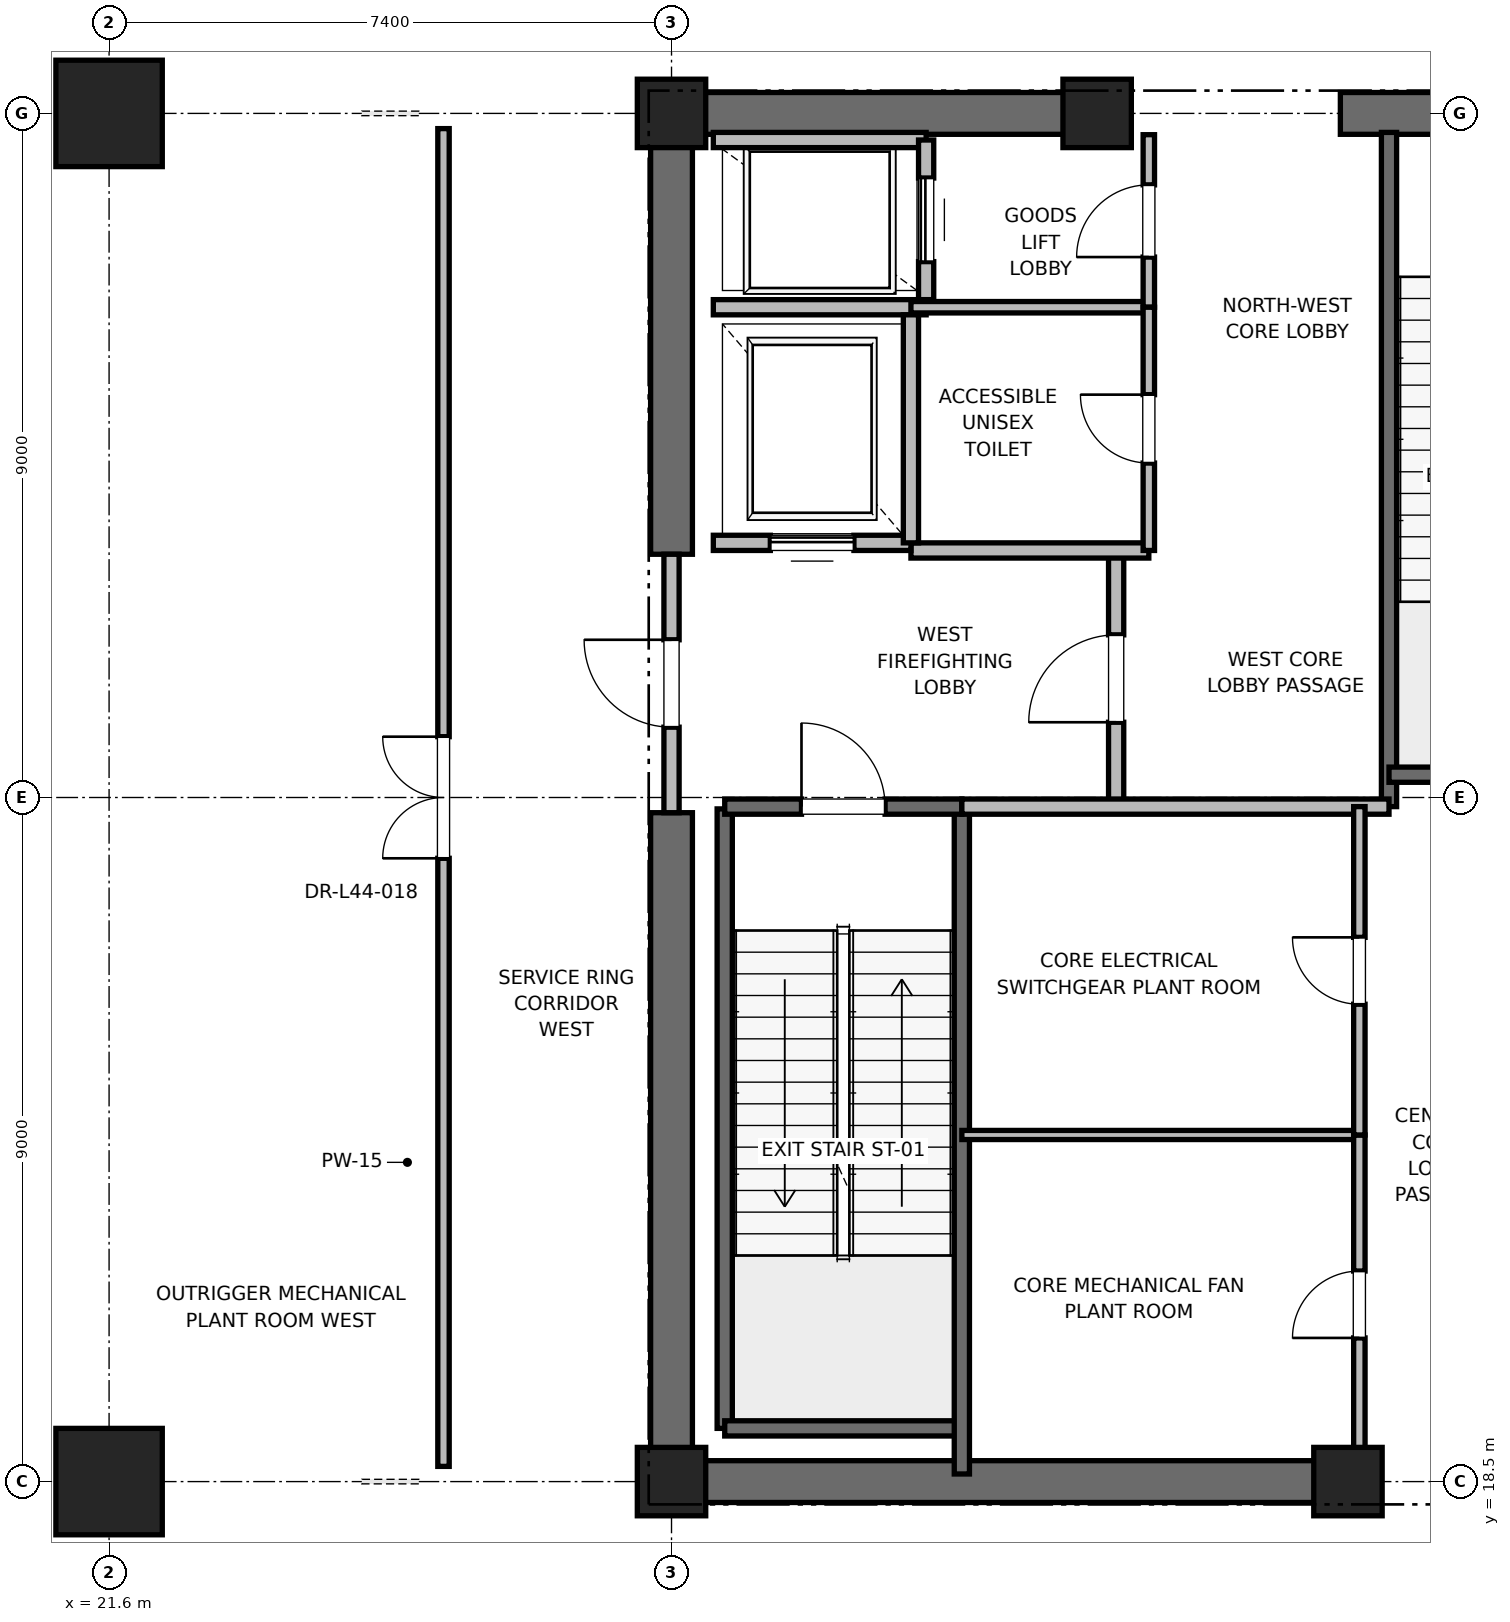
"""IFC4 building model, lengths in metres.
Left out: names, types, materials, properties, quantities, classifications, styles, units other than length and angle.
Written with IfcOpenShell. Run it as: python <this file> out.ifc"""

import sys

from ifc_helpers import new_model, si_unit, direction, frame, frame_2d, origin, origin_2d, place, context, subcontext, project, spatial, rectangle, extrude, element, fill, save


model = new_model("IFC4")
c1 = context("Model", 3, precision=1e-05, world=origin(), true_north=direction((0.0, 1.0)))
c2 = subcontext(c1, "Body", "Model", "MODEL_VIEW")
j1 = project(units=[si_unit("LENGTHUNIT", "METRE"), si_unit("PLANEANGLEUNIT", "RADIAN")], contexts=[c1])
p1 = place(None, origin())
s1 = spatial("IfcSite", under=j1, at=p1, CompositionType="ELEMENT")
p2 = place(p1, origin())
s2 = spatial("IfcBuilding", under=s1, at=p2, CompositionType="ELEMENT")
p3 = place(p2, frame((0.0, 0.0, 189.4)))
s3 = spatial("IfcBuildingStorey", under=s2, at=p3, CompositionType="ELEMENT", Elevation=189.4)
for number, where, z_axis, x_axis in (
    (1, (21.6, 18.5, 0.0), (0.0, 0.0, 1.0), (1.0, 0.0, 0.0)),
    (2, (21.6, 36.5, 0.0), (0.0, 0.0, 1.0), (1.0, 0.0, 0.0)),
):
    element("IfcColumn", number, at=place(p3, frame(where, z_axis=z_axis, x_axis=x_axis)), inside=s3, PredefinedType="COLUMN", context=c2, shape_type="SweptSolid", body=[
        extrude(rectangle(XDim=1.4, YDim=1.4, at=origin_2d()), origin(), (0.0, 0.0, 1.0), 5.4),
    ])
for number, where, z_axis, x_axis in (
    (3, (29.0, 18.5, 0.0), (0.0, 0.0, 1.0), (1.0, 0.0, 0.0)),
    (4, (29.0, 36.5, 0.0), (0.0, 0.0, 1.0), (1.0, 0.0, 0.0)),
    (5, (37.9, 18.5, 0.0), (0.0, 0.0, 1.0), (1.0, 0.0, 0.0)),
    (6, (34.6, 36.5, 0.0), (0.0, 0.0, 1.0), (1.0, 0.0, 0.0)),
):
    element("IfcColumn", number, at=place(p3, frame(where, z_axis=z_axis, x_axis=x_axis)), inside=s3, PredefinedType="PILASTER", context=c2, shape_type="SweptSolid", body=[
        extrude(rectangle(XDim=0.9, YDim=0.9, at=origin_2d()), origin(), (0.0, 0.0, 1.0), 5.4),
    ])
p4 = place(p3, frame((29.0, 18.5, 0.0), z_axis=(0.0, 0.0, 1.0), x_axis=(1.0, 0.0, 0.0)))
e7 = element("IfcWall", 7, at=p4, inside=s3, PredefinedType="SHEAR", context=c2, shape_type="SweptSolid", body=[
    extrude(rectangle(XDim=9.2, YDim=0.55, at=frame_2d((4.6, 0.0))), origin(), (0.0, 0.0, 1.0), 5.1),
])
p5 = place(p3, frame((29.0, 36.5, 0.0), z_axis=(0.0, 0.0, 1.0), x_axis=(1.0, 0.0, 0.0)))
e8 = element("IfcWall", 8, at=p5, inside=s3, PredefinedType="SHEAR", context=c2, shape_type="SweptSolid", body=[
    extrude(rectangle(XDim=5.8, YDim=0.55, at=frame_2d((2.9, 0.0))), origin(), (0.0, 0.0, 1.0), 5.1),
])
p6 = place(p3, frame((37.8, 36.5, 0.0), z_axis=(0.0, 0.0, 1.0), x_axis=(1.0, 0.0, 0.0)))
e9 = element("IfcWall", 9, at=p6, inside=s3, PredefinedType="SHEAR", context=c2, shape_type="SweptSolid", body=[
    extrude(rectangle(XDim=4.4, YDim=0.55, at=frame_2d((2.2, 0.0))), origin(), (0.0, 0.0, 1.0), 5.1),
])
p7 = place(p6, frame((1.65, 0.0, 0.0)))
e10 = element("IfcOpeningElement", 10, at=p7, cuts=e9, PredefinedType="OPENING", context=c2, shape_type="SweptSolid", body=[
    extrude(rectangle(XDim=1.1, YDim=2.15, at=frame_2d((0.55, 1.075))), frame((0.0, 0.275, 0.0), z_axis=(0.0, -1.0, 0.0), x_axis=(1.0, 0.0, 0.0)), (0.0, 0.0, 1.0), 0.55),
])
p8 = place(p3, frame((29.0, 18.5, 0.0), z_axis=(0.0, 0.0, 1.0), x_axis=(0.0, 1.0, 0.0)))
e11 = element("IfcWall", 11, at=p8, inside=s3, PredefinedType="SHEAR", context=c2, shape_type="SweptSolid", body=[
    extrude(rectangle(XDim=8.8, YDim=0.55, at=frame_2d((4.4, 0.0))), origin(), (0.0, 0.0, 1.0), 5.1),
])
p9 = place(p3, frame((29.0, 30.7, 0.0), z_axis=(0.0, 0.0, 1.0), x_axis=(0.0, 1.0, 0.0)))
e12 = element("IfcWall", 12, at=p9, inside=s3, PredefinedType="SHEAR", context=c2, shape_type="SweptSolid", body=[
    extrude(rectangle(XDim=5.8, YDim=0.55, at=frame_2d((2.9, 0.0))), origin(), (0.0, 0.0, 1.0), 5.1),
])
p10 = place(p3, frame((29.7, 19.2, 0.0), z_axis=(0.0, 0.0, 1.0), x_axis=(0.0, 1.0, 0.0)))
e13 = element("IfcWall", 13, at=p10, inside=s3, PredefinedType="SOLIDWALL", context=c2, shape_type="SweptSolid", body=[
    extrude(rectangle(XDim=8.15, YDim=0.2, at=frame_2d((4.075, 0.0))), origin(), (0.0, 0.0, 1.0), 5.1),
])
p11 = place(p3, frame((29.7, 19.2, 0.0), z_axis=(0.0, 0.0, 1.0), x_axis=(1.0, 0.0, 0.0)))
e14 = element("IfcWall", 14, at=p11, inside=s3, PredefinedType="SOLIDWALL", context=c2, shape_type="SweptSolid", body=[
    extrude(rectangle(XDim=3.12, YDim=0.2, at=frame_2d((1.56, 0.0))), origin(), (0.0, 0.0, 1.0), 5.1),
])
p12 = place(p3, frame((32.82, 18.6, 0.0), z_axis=(0.0, 0.0, 1.0), x_axis=(0.0, 1.0, 0.0)))
e15 = element("IfcWall", 15, at=p12, inside=s3, PredefinedType="SOLIDWALL", context=c2, shape_type="SweptSolid", body=[
    extrude(rectangle(XDim=8.78, YDim=0.2, at=frame_2d((4.39, 0.0))), origin(), (0.0, 0.0, 1.0), 5.1),
])
p13 = place(p3, frame((29.7, 27.38, 0.0), z_axis=(0.0, 0.0, 1.0), x_axis=(1.0, 0.0, 0.0)))
e16 = element("IfcWall", 16, at=p13, inside=s3, PredefinedType="SOLIDWALL", context=c2, shape_type="SweptSolid", body=[
    extrude(rectangle(XDim=3.12, YDim=0.2, at=frame_2d((1.56, 0.0))), origin(), (0.0, 0.0, 1.0), 5.1),
])
p14 = place(p13, frame((1.01, 0.0, 0.0)))
e17 = element("IfcOpeningElement", 17, at=p14, cuts=e16, PredefinedType="OPENING", context=c2, shape_type="SweptSolid", body=[
    extrude(rectangle(XDim=1.1, YDim=2.15, at=frame_2d((0.55, 1.075))), frame((0.0, 0.1, 0.0), z_axis=(0.0, -1.0, 0.0), x_axis=(1.0, 0.0, 0.0)), (0.0, 0.0, 1.0), 0.2),
])
p15 = place(p3, frame((38.44, 27.38, 0.0), z_axis=(0.0, 0.0, 1.0), x_axis=(0.0, 1.0, 0.0)))
e18 = element("IfcWall", 18, at=p15, inside=s3, PredefinedType="SOLIDWALL", context=c2, shape_type="SweptSolid", body=[
    extrude(rectangle(XDim=8.87, YDim=0.2, at=frame_2d((4.435, 0.0))), origin(), (0.0, 0.0, 1.0), 5.1),
])
p16 = place(p3, frame((38.44, 27.8, 0.0), z_axis=(0.0, 0.0, 1.0), x_axis=(1.0, 0.0, 0.0)))
e19 = element("IfcWall", 19, at=p16, inside=s3, PredefinedType="SOLIDWALL", context=c2, shape_type="SweptSolid", body=[
    extrude(rectangle(XDim=3.32, YDim=0.2, at=frame_2d((1.66, 0.0))), origin(), (0.0, 0.0, 1.0), 5.1),
])
p17 = place(p3, frame((34.85, 27.38, 0.0), z_axis=(0.0, 0.0, 1.0), x_axis=(0.0, 1.0, 0.0)))
e20 = element("IfcWall", 20, at=p17, inside=s3, PredefinedType="PARTITIONING", context=c2, shape_type="SweptSolid", body=[
    extrude(rectangle(XDim=3.37, YDim=0.2, at=frame_2d((1.685, 0.0))), origin(), (0.0, 0.0, 1.0), 5.1),
])
p18 = place(p17, frame((1.11, 0.0, 0.0)))
e21 = element("IfcOpeningElement", 21, at=p18, cuts=e20, PredefinedType="OPENING", context=c2, shape_type="SweptSolid", body=[
    extrude(rectangle(XDim=1.15, YDim=2.2, at=frame_2d((0.575, 1.1))), frame((0.0, 0.1, 0.0), z_axis=(0.0, -1.0, 0.0), x_axis=(1.0, 0.0, 0.0)), (0.0, 0.0, 1.0), 0.2),
])
p19 = place(p3, frame((29.0, 27.3, 0.0), z_axis=(0.0, 0.0, 1.0), x_axis=(0.0, 1.0, 0.0)))
e22 = element("IfcWall", 22, at=p19, inside=s3, PredefinedType="PARTITIONING", context=c2, shape_type="SweptSolid", body=[
    extrude(rectangle(XDim=3.4, YDim=0.2, at=frame_2d((1.7, 0.0))), origin(), (0.0, 0.0, 1.0), 4.08),
])
p20 = place(p19, frame((1.125, 0.0, 0.0)))
e23 = element("IfcOpeningElement", 23, at=p20, cuts=e22, PredefinedType="OPENING", context=c2, shape_type="SweptSolid", body=[
    extrude(rectangle(XDim=1.15, YDim=2.2, at=frame_2d((0.575, 1.1))), frame((0.0, 0.1, 0.0), z_axis=(0.0, -1.0, 0.0), x_axis=(1.0, 0.0, 0.0)), (0.0, 0.0, 1.0), 0.2),
])
p21 = place(p3, frame((32.82, 27.38, 0.0), z_axis=(0.0, 0.0, 1.0), x_axis=(1.0, 0.0, 0.0)))
e24 = element("IfcWall", 24, at=p21, inside=s3, PredefinedType="PARTITIONING", context=c2, shape_type="SweptSolid", body=[
    extrude(rectangle(XDim=5.62, YDim=0.2, at=frame_2d((2.81, 0.0))), origin(), (0.0, 0.0, 1.0), 5.1),
])
p22 = place(p3, frame((32.15, 30.75, 0.0), z_axis=(0.0, 0.0, 1.0), x_axis=(1.0, 0.0, 0.0)))
e25 = element("IfcWall", 25, at=p22, inside=s3, PredefinedType="PARTITIONING", context=c2, shape_type="SweptSolid", body=[
    extrude(rectangle(XDim=3.13, YDim=0.2, at=frame_2d((1.565, 0.0))), origin(), (0.0, 0.0, 1.0), 5.1),
])
p23 = place(p3, frame((29.55, 30.85, 0.0), z_axis=(0.0, 0.0, 1.0), x_axis=(1.0, 0.0, 0.0)))
e26 = element("IfcWall", 26, at=p23, inside=s3, PredefinedType="SOLIDWALL", context=c2, shape_type="SweptSolid", body=[
    extrude(rectangle(XDim=2.6, YDim=0.2, at=frame_2d((1.3, 0.0))), origin(), (0.0, 0.0, 1.0), 4.08),
])
p24 = place(p23, frame((0.75, 0.0, 0.0)))
e27 = element("IfcOpeningElement", 27, at=p24, cuts=e26, PredefinedType="OPENING", context=c2, shape_type="SweptSolid", body=[
    extrude(rectangle(XDim=1.1, YDim=2.2, at=frame_2d((0.55, 1.1))), frame((0.0, 0.1, 0.0), z_axis=(0.0, -1.0, 0.0), x_axis=(1.0, 0.0, 0.0)), (0.0, 0.0, 1.0), 0.2),
])
p25 = place(p3, frame((29.55, 33.95, 0.0), z_axis=(0.0, 0.0, 1.0), x_axis=(1.0, 0.0, 0.0)))
e28 = element("IfcWall", 28, at=p25, inside=s3, PredefinedType="SOLIDWALL", context=c2, shape_type="SweptSolid", body=[
    extrude(rectangle(XDim=2.8, YDim=0.2, at=frame_2d((1.4, 0.0))), origin(), (0.0, 0.0, 1.0), 5.1),
])
p26 = place(p3, frame((32.15, 30.85, 0.0), z_axis=(0.0, 0.0, 1.0), x_axis=(0.0, 1.0, 0.0)))
e29 = element("IfcWall", 29, at=p26, inside=s3, PredefinedType="SOLIDWALL", context=c2, shape_type="SweptSolid", body=[
    extrude(rectangle(XDim=3.0, YDim=0.2, at=frame_2d((1.5, 0.0))), origin(), (0.0, 0.0, 1.0), 5.1),
])
p27 = place(p3, frame((32.35, 36.15, 0.0), z_axis=(0.0, 0.0, 1.0), x_axis=(-1.0, 0.0, 0.0)))
e30 = element("IfcWall", 30, at=p27, inside=s3, PredefinedType="SOLIDWALL", context=c2, shape_type="SweptSolid", body=[
    extrude(rectangle(XDim=2.8, YDim=0.2, at=frame_2d((1.4, 0.0))), origin(), (0.0, 0.0, 1.0), 4.154),
])
p28 = place(p3, frame((32.35, 34.05, 0.0), z_axis=(0.0, 0.0, 1.0), x_axis=(0.0, 1.0, 0.0)))
e31 = element("IfcWall", 31, at=p28, inside=s3, PredefinedType="SOLIDWALL", context=c2, shape_type="SweptSolid", body=[
    extrude(rectangle(XDim=2.1, YDim=0.2, at=frame_2d((1.05, 0.0))), origin(), (0.0, 0.0, 1.0), 5.1),
])
p29 = place(p28, frame((0.5, 0.0, 0.0)))
e32 = element("IfcOpeningElement", 32, at=p29, cuts=e31, PredefinedType="OPENING", context=c2, shape_type="SweptSolid", body=[
    extrude(rectangle(XDim=1.1, YDim=2.2, at=frame_2d((0.55, 1.1))), frame((0.0, 0.1, 0.0), z_axis=(0.0, -1.0, 0.0), x_axis=(1.0, 0.0, 0.0)), (0.0, 0.0, 1.0), 0.2),
])
p30 = place(p3, frame((32.15, 33.95, 0.0), z_axis=(0.0, 0.0, 1.0), x_axis=(1.0, 0.0, 0.0)))
e33 = element("IfcWall", 33, at=p30, inside=s3, PredefinedType="PARTITIONING", context=c2, shape_type="SweptSolid", body=[
    extrude(rectangle(XDim=3.13, YDim=0.15, at=frame_2d((1.565, 0.0))), origin(), (0.0, 0.0, 1.0), 2.85),
])
p31 = place(p3, frame((35.28, 33.95, 0.0), z_axis=(0.0, 0.0, 1.0), x_axis=(0.0, 1.0, 0.0)))
e34 = element("IfcWall", 34, at=p31, inside=s3, PredefinedType="PARTITIONING", context=c2, shape_type="SweptSolid", body=[
    extrude(rectangle(XDim=2.27, YDim=0.15, at=frame_2d((1.135, 0.0))), origin(), (0.0, 0.0, 1.0), 2.85),
])
p32 = place(p31, frame((0.66, 0.0, 0.0)))
e35 = element("IfcOpeningElement", 35, at=p32, cuts=e34, PredefinedType="OPENING", context=c2, shape_type="SweptSolid", body=[
    extrude(rectangle(XDim=0.95, YDim=2.15, at=frame_2d((0.475, 1.075))), frame((0.0, 0.075, 0.0), z_axis=(0.0, -1.0, 0.0), x_axis=(1.0, 0.0, 0.0)), (0.0, 0.0, 1.0), 0.15),
])
p33 = place(p3, frame((35.28, 30.75, 0.0), z_axis=(0.0, 0.0, 1.0), x_axis=(0.0, 1.0, 0.0)))
e36 = element("IfcWall", 36, at=p33, inside=s3, PredefinedType="PARTITIONING", context=c2, shape_type="SweptSolid", body=[
    extrude(rectangle(XDim=3.2, YDim=0.15, at=frame_2d((1.6, 0.0))), origin(), (0.0, 0.0, 1.0), 2.85),
])
p34 = place(p33, frame((1.15, 0.0, 0.0)))
e37 = element("IfcOpeningElement", 37, at=p34, cuts=e36, PredefinedType="OPENING", context=c2, shape_type="SweptSolid", body=[
    extrude(rectangle(XDim=0.9, YDim=2.1, at=frame_2d((0.45, 1.05))), frame((0.0, 0.075, 0.0), z_axis=(0.0, -1.0, 0.0), x_axis=(1.0, 0.0, 0.0)), (0.0, 0.0, 1.0), 0.15),
])
p35 = place(p3, frame((32.82, 23.06, 0.0), z_axis=(0.0, 0.0, 1.0), x_axis=(1.0, 0.0, 0.0)))
e38 = element("IfcWall", 38, at=p35, inside=s3, PredefinedType="PARTITIONING", context=c2, shape_type="SweptSolid", body=[
    extrude(rectangle(XDim=5.23, YDim=0.12, at=frame_2d((2.615, 0.0))), origin(), (0.0, 0.0, 1.0), 2.85),
])
p36 = place(p3, frame((38.05, 18.6, 0.0), z_axis=(0.0, 0.0, 1.0), x_axis=(0.0, 1.0, 0.0)))
e39 = element("IfcWall", 39, at=p36, inside=s3, PredefinedType="PARTITIONING", context=c2, shape_type="SweptSolid", body=[
    extrude(rectangle(XDim=4.46, YDim=0.15, at=frame_2d((2.23, 0.0))), origin(), (0.0, 0.0, 1.0), 2.85),
])
p37 = place(p36, frame((1.79, 0.0, 0.0)))
e40 = element("IfcOpeningElement", 40, at=p37, cuts=e39, PredefinedType="OPENING", context=c2, shape_type="SweptSolid", body=[
    extrude(rectangle(XDim=0.88, YDim=2.1, at=frame_2d((0.44, 1.05))), frame((0.0, 0.075, 0.0), z_axis=(0.0, -1.0, 0.0), x_axis=(1.0, 0.0, 0.0)), (0.0, 0.0, 1.0), 0.15),
])
p38 = place(p3, frame((38.05, 23.06, 0.0), z_axis=(0.0, 0.0, 1.0), x_axis=(0.0, 1.0, 0.0)))
e41 = element("IfcWall", 41, at=p38, inside=s3, PredefinedType="PARTITIONING", context=c2, shape_type="SweptSolid", body=[
    extrude(rectangle(XDim=4.32, YDim=0.15, at=frame_2d((2.16, 0.0))), origin(), (0.0, 0.0, 1.0), 2.85),
])
p39 = place(p38, frame((1.72, 0.0, 0.0)))
e42 = element("IfcOpeningElement", 42, at=p39, cuts=e41, PredefinedType="OPENING", context=c2, shape_type="SweptSolid", body=[
    extrude(rectangle(XDim=0.88, YDim=2.1, at=frame_2d((0.44, 1.05))), frame((0.0, 0.075, 0.0), z_axis=(0.0, -1.0, 0.0), x_axis=(1.0, 0.0, 0.0)), (0.0, 0.0, 1.0), 0.15),
])
p40 = place(p3, frame((26.0, 18.7, 0.0), z_axis=(0.0, 0.0, 1.0), x_axis=(0.0, 1.0, 0.0)))
e43 = element("IfcWall", 43, at=p40, inside=s3, PredefinedType="PARTITIONING", context=c2, shape_type="SweptSolid", body=[
    extrude(rectangle(XDim=17.6, YDim=0.15, at=frame_2d((8.8, 0.0))), origin(), (0.0, 0.0, 1.0), 2.85),
])
p41 = place(p40, frame((8.0, 0.0, 0.0)))
e44 = element("IfcOpeningElement", 44, at=p41, cuts=e43, PredefinedType="OPENING", context=c2, shape_type="SweptSolid", body=[
    extrude(rectangle(XDim=1.6, YDim=2.25, at=frame_2d((0.8, 1.125))), frame((0.0, 0.075, 0.0), z_axis=(0.0, -1.0, 0.0), x_axis=(1.0, 0.0, 0.0)), (0.0, 0.0, 1.0), 0.15),
])
p42 = place(p14, origin())
e45 = element("IfcDoor", 45, at=p42, inside=s3, OperationType="SINGLE_SWING_LEFT", PredefinedType="DOOR", context=c2, shape_type="SweptSolid", body=[
    extrude(rectangle(XDim=1.1, YDim=2.15, at=frame_2d((0.55, 1.075))), frame((0.0, 0.025, 0.0), z_axis=(0.0, -1.0, 0.0), x_axis=(1.0, 0.0, 0.0)), (0.0, 0.0, 1.0), 0.05),
])
fill(e17, e45)
p43 = place(p18, origin())
e46 = element("IfcDoor", 46, at=p43, inside=s3, OperationType="SINGLE_SWING_LEFT", PredefinedType="DOOR", context=c2, shape_type="SweptSolid", body=[
    extrude(rectangle(XDim=1.15, YDim=2.2, at=frame_2d((0.575, 1.1))), frame((0.0, 0.025, 0.0), z_axis=(0.0, -1.0, 0.0), x_axis=(1.0, 0.0, 0.0)), (0.0, 0.0, 1.0), 0.05),
])
fill(e21, e46)
p44 = place(p20, origin())
e47 = element("IfcDoor", 47, at=p44, inside=s3, OperationType="SINGLE_SWING_RIGHT", PredefinedType="DOOR", context=c2, shape_type="SweptSolid", body=[
    extrude(rectangle(XDim=1.15, YDim=2.2, at=frame_2d((0.575, 1.1))), frame((0.0, 0.025, 0.0), z_axis=(0.0, -1.0, 0.0), x_axis=(1.0, 0.0, 0.0)), (0.0, 0.0, 1.0), 0.05),
])
fill(e23, e47)
p45 = place(p24, origin())
e48 = element("IfcDoor", 48, at=p45, inside=s3, OperationType="SLIDING_TO_RIGHT", PredefinedType="DOOR", context=c2, shape_type="SweptSolid", body=[
    extrude(rectangle(XDim=1.1, YDim=2.2, at=frame_2d((0.55, 1.1))), frame((0.0, 0.025, 0.0), z_axis=(0.0, -1.0, 0.0), x_axis=(1.0, 0.0, 0.0)), (0.0, 0.0, 1.0), 0.05),
])
fill(e27, e48)
p46 = place(p29, origin())
e49 = element("IfcDoor", 49, at=p46, inside=s3, OperationType="SLIDING_TO_RIGHT", PredefinedType="DOOR", context=c2, shape_type="SweptSolid", body=[
    extrude(rectangle(XDim=1.1, YDim=2.2, at=frame_2d((0.55, 1.1))), frame((0.0, 0.025, 0.0), z_axis=(0.0, -1.0, 0.0), x_axis=(1.0, 0.0, 0.0)), (0.0, 0.0, 1.0), 0.05),
])
fill(e32, e49)
p47 = place(p32, origin())
e50 = element("IfcDoor", 50, at=p47, inside=s3, OperationType="SINGLE_SWING_LEFT", PredefinedType="DOOR", context=c2, shape_type="SweptSolid", body=[
    extrude(rectangle(XDim=0.95, YDim=2.15, at=frame_2d((0.475, 1.075))), frame((0.0, 0.025, 0.0), z_axis=(0.0, -1.0, 0.0), x_axis=(1.0, 0.0, 0.0)), (0.0, 0.0, 1.0), 0.05),
])
fill(e35, e50)
p48 = place(p34, origin())
e51 = element("IfcDoor", 51, at=p48, inside=s3, OperationType="SINGLE_SWING_RIGHT", PredefinedType="DOOR", context=c2, shape_type="SweptSolid", body=[
    extrude(rectangle(XDim=0.9, YDim=2.1, at=frame_2d((0.45, 1.05))), frame((0.0, 0.025, 0.0), z_axis=(0.0, -1.0, 0.0), x_axis=(1.0, 0.0, 0.0)), (0.0, 0.0, 1.0), 0.05),
])
fill(e37, e51)
p49 = place(p37, origin())
e52 = element("IfcDoor", 52, at=p49, inside=s3, OperationType="SINGLE_SWING_LEFT", PredefinedType="DOOR", context=c2, shape_type="SweptSolid", body=[
    extrude(rectangle(XDim=0.88, YDim=2.1, at=frame_2d((0.44, 1.05))), frame((0.0, 0.025, 0.0), z_axis=(0.0, -1.0, 0.0), x_axis=(1.0, 0.0, 0.0)), (0.0, 0.0, 1.0), 0.05),
])
fill(e40, e52)
p50 = place(p39, origin())
e53 = element("IfcDoor", 53, at=p50, inside=s3, OperationType="SINGLE_SWING_RIGHT", PredefinedType="DOOR", context=c2, shape_type="SweptSolid", body=[
    extrude(rectangle(XDim=0.88, YDim=2.1, at=frame_2d((0.44, 1.05))), frame((0.0, 0.025, 0.0), z_axis=(0.0, -1.0, 0.0), x_axis=(1.0, 0.0, 0.0)), (0.0, 0.0, 1.0), 0.05),
])
fill(e42, e53)
p51 = place(p41, origin())
e54 = element("IfcDoor", 54, at=p51, inside=s3, OperationType="DOUBLE_DOOR_SINGLE_SWING", PredefinedType="DOOR", context=c2, shape_type="SweptSolid", body=[
    extrude(rectangle(XDim=1.6, YDim=2.25, at=frame_2d((0.8, 1.125))), frame((0.0, 0.025, 0.0), z_axis=(0.0, -1.0, 0.0), x_axis=(1.0, 0.0, 0.0)), (0.0, 0.0, 1.0), 0.05),
])
fill(e44, e54)
save(model, sys.argv[1])
